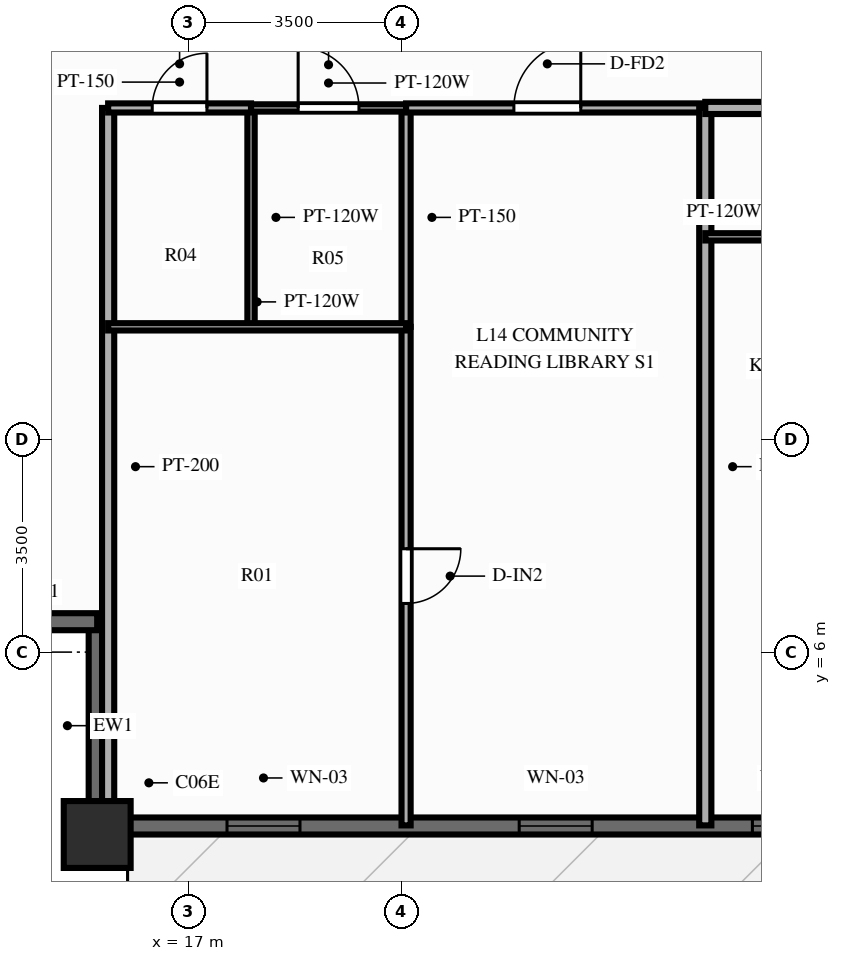
"""IFC4 building model, lengths in metres.
Left out: names, types, materials, properties, quantities, classifications, styles, units other than length and angle.
Written with IfcOpenShell. Run it as: python <this file> out.ifc"""

import sys

from ifc_helpers import new_model, si_unit, direction, frame, frame_2d, origin, origin_2d, place, context, subcontext, project, spatial, rectangle, extrude, source, transform, mapped, element, fill, save


model = new_model("IFC4")
c1 = context("Model", 3, precision=1e-05, world=origin(), true_north=direction((0.0, 1.0)))
c2 = subcontext(c1, "Body", "Model", "MODEL_VIEW")
j1 = project(units=[si_unit("LENGTHUNIT", "METRE"), si_unit("PLANEANGLEUNIT", "RADIAN")], contexts=[c1])
p1 = place(None, origin())
s1 = spatial("IfcSite", under=j1, at=p1, CompositionType="ELEMENT")
p2 = place(p1, origin())
s2 = spatial("IfcBuilding", under=s1, at=p2, CompositionType="ELEMENT")
p3 = place(p2, frame((0.0, 0.0, 46.4)))
s3 = spatial("IfcBuildingStorey", under=s2, at=p3, CompositionType="ELEMENT", Elevation=46.4)
m1 = source(origin(), c2, "Body", "SweptSolid", [
    extrude(rectangle(XDim=1.1, YDim=1.1, at=origin_2d()), origin(), (0.0, 0.0, 1.0), 3.0),
])
p4 = place(p3, frame((15.5, 3.0, 0.0), z_axis=(0.0, 0.0, 1.0), x_axis=(1.0, 0.0, 0.0)))
e1 = element("IfcColumn", 1, at=p4, inside=s3, PredefinedType="COLUMN", context=c2, shape_type="MappedRepresentation", body=[
    mapped(m1, transform((0.0, 0.0, 0.0), scale=1.0)),
])
p5 = place(p3, frame((15.5, 3.14, 0.0), z_axis=(0.0, 0.0, 1.0), x_axis=(1.0, 0.0, 0.0)))
e2 = element("IfcWall", 2, at=p5, inside=s3, PredefinedType="SOLIDWALL", context=c2, shape_type="SweptSolid", body=[
    extrude(rectangle(XDim=45.0, YDim=0.28, at=frame_2d((22.5, 0.0))), origin(), (0.0, 0.0, 1.0), 2.28),
])
p6 = place(p5, frame((2.135, 0.0, 0.25)))
e3 = element("IfcOpeningElement", 3, at=p6, cuts=e2, PredefinedType="OPENING", context=c2, shape_type="SweptSolid", body=[
    extrude(rectangle(XDim=1.2, YDim=1.5, at=frame_2d((0.6, 0.75))), frame((0.0, 0.152, 0.0), z_axis=(0.0, -1.0, 0.0), x_axis=(1.0, 0.0, 0.0)), (0.0, 0.0, 1.0), 0.304),
])
p7 = place(p5, frame((6.94, 0.0, 0.25)))
e4 = element("IfcOpeningElement", 4, at=p7, cuts=e2, PredefinedType="OPENING", context=c2, shape_type="SweptSolid", body=[
    extrude(rectangle(XDim=1.2, YDim=1.5, at=frame_2d((0.6, 0.75))), frame((0.0, 0.152, 0.0), z_axis=(0.0, -1.0, 0.0), x_axis=(1.0, 0.0, 0.0)), (0.0, 0.0, 1.0), 0.304),
])
p8 = place(p5, frame((10.776, 0.0, 0.25)))
e5 = element("IfcOpeningElement", 5, at=p8, cuts=e2, PredefinedType="OPENING", context=c2, shape_type="SweptSolid", body=[
    extrude(rectangle(XDim=1.2, YDim=1.5, at=frame_2d((0.6, 0.75))), frame((0.0, 0.152, 0.0), z_axis=(0.0, -1.0, 0.0), x_axis=(1.0, 0.0, 0.0)), (0.0, 0.0, 1.0), 0.304),
])
p9 = place(p5, frame((13.58, 0.0, 0.25)))
e6 = element("IfcOpeningElement", 6, at=p9, cuts=e2, PredefinedType="OPENING", context=c2, shape_type="SweptSolid", body=[
    extrude(rectangle(XDim=1.2, YDim=1.5, at=frame_2d((0.6, 0.75))), frame((0.0, 0.152, 0.0), z_axis=(0.0, -1.0, 0.0), x_axis=(1.0, 0.0, 0.0)), (0.0, 0.0, 1.0), 0.304),
])
p10 = place(p5, frame((17.506, 0.0, 0.25)))
e7 = element("IfcOpeningElement", 7, at=p10, cuts=e2, PredefinedType="OPENING", context=c2, shape_type="SweptSolid", body=[
    extrude(rectangle(XDim=1.2, YDim=1.5, at=frame_2d((0.6, 0.75))), frame((0.0, 0.152, 0.0), z_axis=(0.0, -1.0, 0.0), x_axis=(1.0, 0.0, 0.0)), (0.0, 0.0, 1.0), 0.304),
])
p11 = place(p5, frame((22.822, 0.0, 0.0), z_axis=(0.0, 0.0, 1.0), x_axis=(-1.0, 0.0, 0.0)))
e8 = element("IfcOpeningElement", 8, at=p11, cuts=e2, PredefinedType="OPENING", context=c2, shape_type="SweptSolid", body=[
    extrude(rectangle(XDim=1.1, YDim=2.15, at=frame_2d((0.55, 1.075))), frame((0.0, 0.152, 0.0), z_axis=(0.0, -1.0, 0.0), x_axis=(1.0, 0.0, 0.0)), (0.0, 0.0, 1.0), 0.304),
])
p12 = place(p5, frame((26.066, 0.0, 0.25)))
e9 = element("IfcOpeningElement", 9, at=p12, cuts=e2, PredefinedType="OPENING", context=c2, shape_type="SweptSolid", body=[
    extrude(rectangle(XDim=1.2, YDim=1.5, at=frame_2d((0.6, 0.75))), frame((0.0, 0.152, 0.0), z_axis=(0.0, -1.0, 0.0), x_axis=(1.0, 0.0, 0.0)), (0.0, 0.0, 1.0), 0.304),
])
p13 = place(p5, frame((30.255, 0.0, 0.25)))
e10 = element("IfcOpeningElement", 10, at=p13, cuts=e2, PredefinedType="OPENING", context=c2, shape_type="SweptSolid", body=[
    extrude(rectangle(XDim=1.2, YDim=1.5, at=frame_2d((0.6, 0.75))), frame((0.0, 0.152, 0.0), z_axis=(0.0, -1.0, 0.0), x_axis=(1.0, 0.0, 0.0)), (0.0, 0.0, 1.0), 0.304),
])
p14 = place(p5, frame((33.346, 0.0, 0.25)))
e11 = element("IfcOpeningElement", 11, at=p14, cuts=e2, PredefinedType="OPENING", context=c2, shape_type="SweptSolid", body=[
    extrude(rectangle(XDim=1.2, YDim=1.5, at=frame_2d((0.6, 0.75))), frame((0.0, 0.152, 0.0), z_axis=(0.0, -1.0, 0.0), x_axis=(1.0, 0.0, 0.0)), (0.0, 0.0, 1.0), 0.304),
])
p15 = place(p5, frame((37.821, 0.0, 0.25)))
e12 = element("IfcOpeningElement", 12, at=p15, cuts=e2, PredefinedType="OPENING", context=c2, shape_type="SweptSolid", body=[
    extrude(rectangle(XDim=1.2, YDim=1.5, at=frame_2d((0.6, 0.75))), frame((0.0, 0.152, 0.0), z_axis=(0.0, -1.0, 0.0), x_axis=(1.0, 0.0, 0.0)), (0.0, 0.0, 1.0), 0.304),
])
p16 = place(p5, frame((42.341, 0.0, 0.25)))
e13 = element("IfcOpeningElement", 13, at=p16, cuts=e2, PredefinedType="OPENING", context=c2, shape_type="SweptSolid", body=[
    extrude(rectangle(XDim=1.2, YDim=1.5, at=frame_2d((0.6, 0.75))), frame((0.0, 0.152, 0.0), z_axis=(0.0, -1.0, 0.0), x_axis=(1.0, 0.0, 0.0)), (0.0, 0.0, 1.0), 0.304),
])
for number, where, z_axis, x_axis in (
    (14, (15.5, 3.08, 0.0), (0.0, 0.0, 1.0), (0.0, 1.0, 0.0)),
    (15, (12.08, 6.5, 0.0), (0.0, 0.0, 1.0), (1.0, 0.0, 0.0)),
):
    element("IfcWall", number, at=place(p3, frame(where, z_axis=z_axis, x_axis=x_axis)), inside=s3, PredefinedType="SOLIDWALL", context=c2, shape_type="SweptSolid", body=[
        extrude(rectangle(XDim=3.42, YDim=0.28, at=frame_2d((1.71, 0.0))), origin(), (0.0, 0.0, 1.0), 2.28),
    ])
p17 = place(p3, frame((15.68, 14.95, 0.0), z_axis=(0.0, 0.0, 1.0), x_axis=(0.0, -1.0, 0.0)))
e16 = element("IfcWall", 16, at=p17, inside=s3, PredefinedType="PARTITIONING", context=c2, shape_type="SweptSolid", body=[
    extrude(rectangle(XDim=11.8, YDim=0.2, at=frame_2d((5.9, 0.0))), origin(), (0.0, 0.0, 1.0), 2.79),
])
p18 = place(p3, frame((18.03, 14.95, 0.0), z_axis=(0.0, 0.0, 1.0), x_axis=(0.0, -1.0, 0.0)))
e17 = element("IfcWall", 17, at=p18, inside=s3, PredefinedType="PARTITIONING", context=c2, shape_type="SweptSolid", body=[
    extrude(rectangle(XDim=3.6, YDim=0.12, at=frame_2d((1.8, 0.0))), origin(), (0.0, 0.0, 1.0), 2.79),
])
p19 = place(p3, frame((20.58, 14.95, 0.0), z_axis=(0.0, 0.0, 1.0), x_axis=(0.0, -1.0, 0.0)))
e18 = element("IfcWall", 18, at=p19, inside=s3, PredefinedType="PARTITIONING", context=c2, shape_type="SweptSolid", body=[
    extrude(rectangle(XDim=3.6, YDim=0.15, at=frame_2d((1.8, 0.0))), origin(), (0.0, 0.0, 1.0), 2.79),
])
p20 = place(p3, frame((20.58, 11.35, 0.0), z_axis=(0.0, 0.0, 1.0), x_axis=(0.0, -1.0, 0.0)))
e19 = element("IfcWall", 19, at=p20, inside=s3, PredefinedType="PARTITIONING", context=c2, shape_type="SweptSolid", body=[
    extrude(rectangle(XDim=8.2, YDim=0.15, at=frame_2d((4.1, 0.0))), origin(), (0.0, 0.0, 1.0), 2.79),
])
p21 = place(p20, frame((3.65, 0.0, 0.0)))
e20 = element("IfcOpeningElement", 20, at=p21, cuts=e19, PredefinedType="OPENING", context=c2, shape_type="SweptSolid", body=[
    extrude(rectangle(XDim=0.9, YDim=2.1, at=frame_2d((0.45, 1.05))), frame((0.0, 0.087, 0.0), z_axis=(0.0, -1.0, 0.0), x_axis=(1.0, 0.0, 0.0)), (0.0, 0.0, 1.0), 0.174),
])
p22 = place(p3, frame((15.68, 11.35, 0.0), z_axis=(0.0, 0.0, 1.0), x_axis=(1.0, 0.0, 0.0)))
e21 = element("IfcWall", 21, at=p22, inside=s3, PredefinedType="PARTITIONING", context=c2, shape_type="SweptSolid", body=[
    extrude(rectangle(XDim=4.9, YDim=0.12, at=frame_2d((2.45, 0.0))), origin(), (0.0, 0.0, 1.0), 2.79),
])
p23 = place(p3, frame((15.68, 14.95, 0.0), z_axis=(0.0, 0.0, 1.0), x_axis=(1.0, 0.0, 0.0)))
e22 = element("IfcWall", 22, at=p23, inside=s3, PredefinedType="PARTITIONING", context=c2, shape_type="SweptSolid", body=[
    extrude(rectangle(XDim=2.35, YDim=0.15, at=frame_2d((1.175, 0.0))), origin(), (0.0, 0.0, 1.0), 2.79),
])
p24 = place(p23, frame((0.725, 0.0, 0.0)))
e23 = element("IfcOpeningElement", 23, at=p24, cuts=e22, PredefinedType="OPENING", context=c2, shape_type="SweptSolid", body=[
    extrude(rectangle(XDim=0.9, YDim=2.1, at=frame_2d((0.45, 1.05))), frame((0.0, 0.087, 0.0), z_axis=(0.0, -1.0, 0.0), x_axis=(1.0, 0.0, 0.0)), (0.0, 0.0, 1.0), 0.174),
])
p25 = place(p3, frame((18.03, 14.95, 0.0), z_axis=(0.0, 0.0, 1.0), x_axis=(1.0, 0.0, 0.0)))
e24 = element("IfcWall", 24, at=p25, inside=s3, PredefinedType="PARTITIONING", context=c2, shape_type="SweptSolid", body=[
    extrude(rectangle(XDim=2.55, YDim=0.12, at=frame_2d((1.275, 0.0))), origin(), (0.0, 0.0, 1.0), 2.79),
])
p26 = place(p25, frame((0.775, 0.0, 0.0)))
e25 = element("IfcOpeningElement", 25, at=p26, cuts=e24, PredefinedType="OPENING", context=c2, shape_type="SweptSolid", body=[
    extrude(rectangle(XDim=1.0, YDim=2.1, at=frame_2d((0.5, 1.05))), frame((0.0, 0.072, 0.0), z_axis=(0.0, -1.0, 0.0), x_axis=(1.0, 0.0, 0.0)), (0.0, 0.0, 1.0), 0.144),
])
p27 = place(p3, frame((20.58, 14.95, 0.0), z_axis=(0.0, 0.0, 1.0), x_axis=(1.0, 0.0, 0.0)))
e26 = element("IfcWall", 26, at=p27, inside=s3, PredefinedType="PARTITIONING", context=c2, shape_type="SweptSolid", body=[
    extrude(rectangle(XDim=4.921, YDim=0.15, at=frame_2d((2.46, 0.0))), origin(), (0.0, 0.0, 1.0), 2.79),
])
p28 = place(p27, frame((1.773, 0.0, 0.0)))
e27 = element("IfcOpeningElement", 27, at=p28, cuts=e26, PredefinedType="OPENING", context=c2, shape_type="SweptSolid", body=[
    extrude(rectangle(XDim=1.1, YDim=2.15, at=frame_2d((0.55, 1.075))), frame((0.0, 0.087, 0.0), z_axis=(0.0, -1.0, 0.0), x_axis=(1.0, 0.0, 0.0)), (0.0, 0.0, 1.0), 0.174),
])
p29 = place(p3, frame((25.501, 14.95, 0.0), z_axis=(0.0, 0.0, 1.0), x_axis=(0.0, -1.0, 0.0)))
e28 = element("IfcWall", 28, at=p29, inside=s3, PredefinedType="PARTITIONING", context=c2, shape_type="SweptSolid", body=[
    extrude(rectangle(XDim=11.8, YDim=0.2, at=frame_2d((5.9, 0.0))), origin(), (0.0, 0.0, 1.0), 2.79),
])
p30 = place(p3, frame((25.501, 14.95, 0.0), z_axis=(0.0, 0.0, 1.0), x_axis=(1.0, 0.0, 0.0)))
e29 = element("IfcWall", 29, at=p30, inside=s3, PredefinedType="PARTITIONING", context=c2, shape_type="SweptSolid", body=[
    extrude(rectangle(XDim=2.75, YDim=0.2, at=frame_2d((1.375, 0.0))), origin(), (0.0, 0.0, 1.0), 2.79),
])
p31 = place(p3, frame((25.501, 12.83, 0.0), z_axis=(0.0, 0.0, 1.0), x_axis=(1.0, 0.0, 0.0)))
e30 = element("IfcWall", 30, at=p31, inside=s3, PredefinedType="PARTITIONING", context=c2, shape_type="SweptSolid", body=[
    extrude(rectangle(XDim=2.75, YDim=0.12, at=frame_2d((1.375, 0.0))), origin(), (0.0, 0.0, 1.0), 2.79),
])
m2 = source(origin(), c2, "Body", "SweptSolid", [
    extrude(rectangle(XDim=1.2, YDim=1.5, at=frame_2d((0.6, 0.75))), frame((0.0, 0.03, 0.0), z_axis=(0.0, -1.0, 0.0), x_axis=(1.0, 0.0, 0.0)), (0.0, 0.0, 1.0), 0.06),
])
p32 = place(p6, origin())
e31 = element("IfcWindow", 31, at=p32, inside=s3, PartitioningType="SINGLE_PANEL", PredefinedType="WINDOW", context=c2, shape_type="MappedRepresentation", body=[
    mapped(m2, transform((0.0, 0.0, 0.0), scale=1.0)),
])
fill(e3, e31)
p33 = place(p7, origin())
e32 = element("IfcWindow", 32, at=p33, inside=s3, PartitioningType="SINGLE_PANEL", PredefinedType="WINDOW", context=c2, shape_type="MappedRepresentation", body=[
    mapped(m2, transform((0.0, 0.0, 0.0), scale=1.0)),
])
fill(e4, e32)
p34 = place(p8, origin())
e33 = element("IfcWindow", 33, at=p34, inside=s3, PartitioningType="SINGLE_PANEL", PredefinedType="WINDOW", context=c2, shape_type="MappedRepresentation", body=[
    mapped(m2, transform((0.0, 0.0, 0.0), scale=1.0)),
])
fill(e5, e33)
m3 = source(origin(), c2, "Body", "SweptSolid", [
    extrude(rectangle(XDim=0.9, YDim=2.1, at=frame_2d((0.45, 1.05))), frame((0.0, 0.025, 0.0), z_axis=(0.0, -1.0, 0.0), x_axis=(1.0, 0.0, 0.0)), (0.0, 0.0, 1.0), 0.05),
])
p35 = place(p21, origin())
e34 = element("IfcDoor", 34, at=p35, inside=s3, OperationType="SINGLE_SWING_LEFT", PredefinedType="DOOR", context=c2, shape_type="MappedRepresentation", body=[
    mapped(m3, transform((0.0, 0.0, 0.0), scale=1.0)),
])
fill(e20, e34)
p36 = place(p24, origin())
e35 = element("IfcDoor", 35, at=p36, inside=s3, OperationType="SINGLE_SWING_RIGHT", PredefinedType="DOOR", context=c2, shape_type="MappedRepresentation", body=[
    mapped(m3, transform((0.0, 0.0, 0.0), scale=1.0)),
])
fill(e23, e35)
m4 = source(origin(), c2, "Body", "SweptSolid", [
    extrude(rectangle(XDim=1.0, YDim=2.1, at=frame_2d((0.5, 1.05))), frame((0.0, 0.025, 0.0), z_axis=(0.0, -1.0, 0.0), x_axis=(1.0, 0.0, 0.0)), (0.0, 0.0, 1.0), 0.05),
])
p37 = place(p26, origin())
e36 = element("IfcDoor", 36, at=p37, inside=s3, OperationType="SINGLE_SWING_LEFT", PredefinedType="DOOR", context=c2, shape_type="MappedRepresentation", body=[
    mapped(m4, transform((0.0, 0.0, 0.0), scale=1.0)),
])
fill(e25, e36)
m5 = source(origin(), c2, "Body", "SweptSolid", [
    extrude(rectangle(XDim=1.1, YDim=2.15, at=frame_2d((0.55, 1.075))), frame((0.0, 0.025, 0.0), z_axis=(0.0, -1.0, 0.0), x_axis=(1.0, 0.0, 0.0)), (0.0, 0.0, 1.0), 0.05),
])
p38 = place(p28, origin())
e37 = element("IfcDoor", 37, at=p38, inside=s3, OperationType="SINGLE_SWING_RIGHT", PredefinedType="DOOR", context=c2, shape_type="MappedRepresentation", body=[
    mapped(m5, transform((0.0, 0.0, 0.0), scale=1.0)),
])
fill(e27, e37)
save(model, sys.argv[1])
